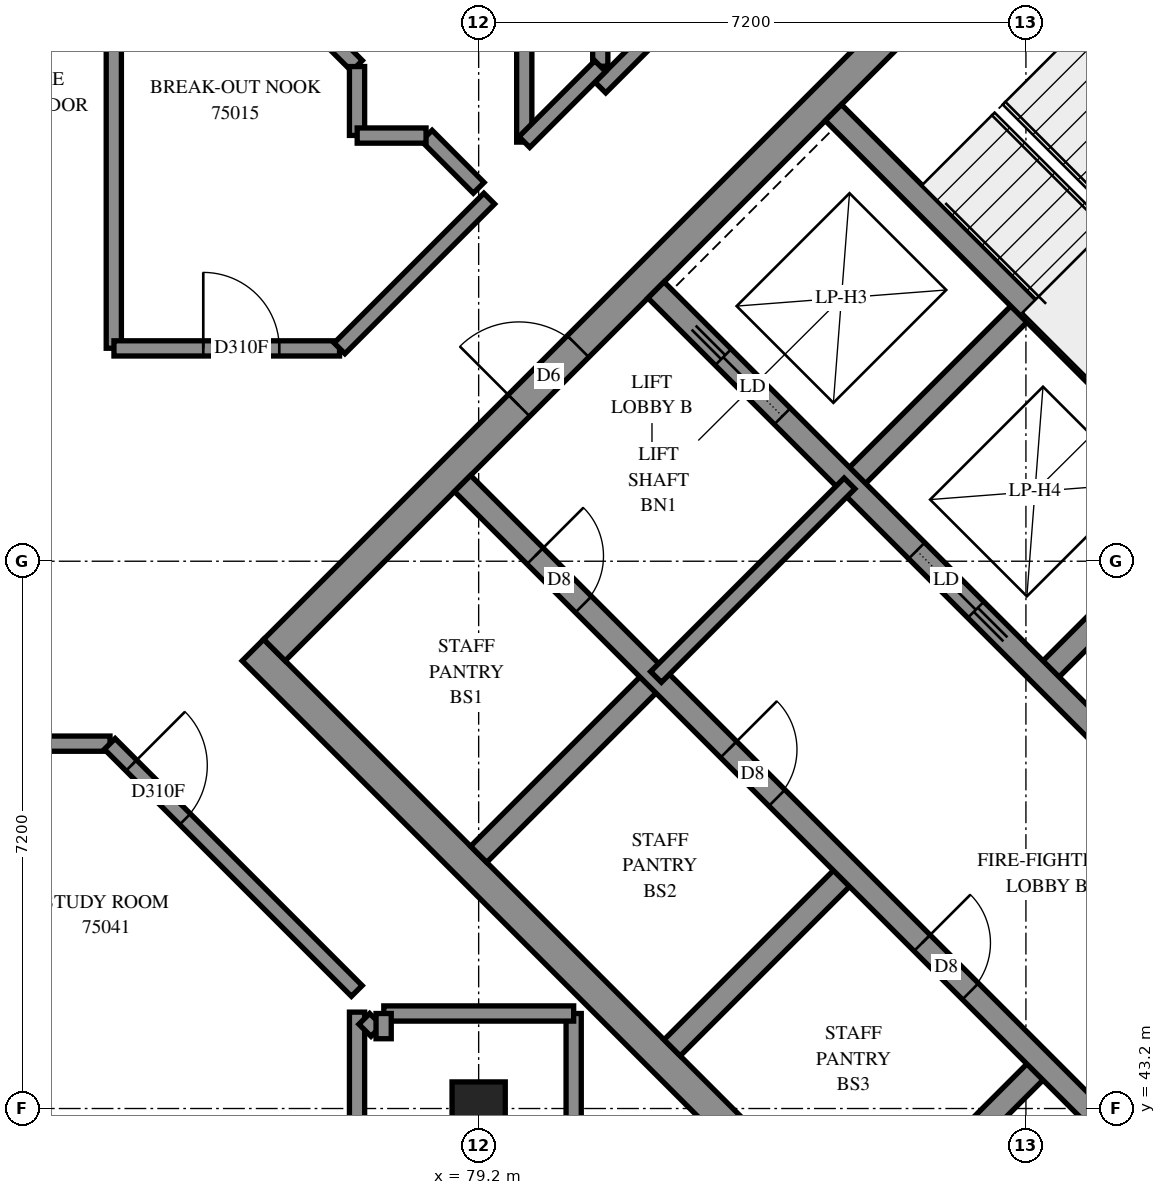
"""IFC4 building model, lengths in metres.
Left out: names, types, materials, properties, quantities, classifications, styles, units other than length and angle.
Written with IfcOpenShell. Run it as: python <this file> out.ifc"""

import sys

from ifc_helpers import new_model, si_unit, direction, frame, frame_2d, origin, origin_2d, place, context, subcontext, project, spatial, rectangle, extrude, element, fill, save


model = new_model("IFC4")
c1 = context("Model", 3, precision=1e-05, world=origin(), true_north=direction((0.0, 1.0)))
c2 = subcontext(c1, "Body", "Model", "MODEL_VIEW")
j1 = project(units=[si_unit("LENGTHUNIT", "METRE"), si_unit("PLANEANGLEUNIT", "RADIAN")], contexts=[c1])
p1 = place(None, origin())
s1 = spatial("IfcSite", under=j1, at=p1, CompositionType="ELEMENT")
p2 = place(p1, origin())
s2 = spatial("IfcBuilding", under=s1, at=p2, CompositionType="ELEMENT")
p3 = place(p2, frame((0.0, 0.0, 274.4)))
s3 = spatial("IfcBuildingStorey", under=s2, at=p3, CompositionType="ELEMENT", Elevation=274.4)
p4 = place(p3, frame((79.2, 43.2, 0.0), z_axis=(0.0, 0.0, 1.0), x_axis=(1.0, 0.0, 0.0)))
e1 = element("IfcColumn", 1, at=p4, inside=s3, PredefinedType="COLUMN", context=c2, shape_type="SweptSolid", body=[
    extrude(rectangle(XDim=0.7, YDim=0.7, at=origin_2d()), origin(), (0.0, 0.0, 1.0), 3.1),
])
p5 = place(p3, frame((76.23, 49.231, -0.3), z_axis=(0.0, 0.0, 1.0), x_axis=(0.7071034917, -0.7071100706, 0.0)))
e2 = element("IfcWall", 2, at=p5, inside=s3, PredefinedType="SHEAR", context=c2, shape_type="SweptSolid", body=[
    extrude(rectangle(XDim=15.2, YDim=0.4, at=frame_2d((7.6, 0.0))), origin(), (0.0, 0.0, 1.0), 2.7),
])
p6 = place(p3, frame((86.695, 59.696, -0.3), z_axis=(0.0, 0.0, 1.0), x_axis=(0.7071100706, -0.7071034917, 0.0)))
e3 = element("IfcWall", 3, at=p6, inside=s3, PredefinedType="SHEAR", context=c2, shape_type="SweptSolid", body=[
    extrude(rectangle(XDim=15.2, YDim=0.4, at=frame_2d((7.6, 0.0))), origin(), (0.0, 0.0, 1.0), 2.7),
])
p7 = place(p6, frame((10.4, 0.0, 0.3)))
e4 = element("IfcOpeningElement", 4, at=p7, cuts=e3, PredefinedType="OPENING", context=c2, shape_type="SweptSolid", body=[
    extrude(rectangle(XDim=0.8, YDim=2.1, at=frame_2d((0.4, 1.05))), frame((0.0, 0.21, 0.0), z_axis=(0.0, -1.0, 0.0), x_axis=(1.0, 0.0, 0.0)), (0.0, 0.0, 1.0), 0.42),
])
p8 = place(p3, frame((76.513, 49.231, -0.3), z_axis=(0.0, 0.0, 1.0), x_axis=(0.7071067812, 0.7071067812, 0.0)))
e5 = element("IfcWall", 5, at=p8, inside=s3, PredefinedType="SHEAR", context=c2, shape_type="SweptSolid", body=[
    extrude(rectangle(XDim=14.4, YDim=0.4, at=frame_2d((7.2, 0.0))), origin(), (0.0, 0.0, 1.0), 2.7),
])
p9 = place(p8, frame((4.55, 0.0, 0.3)))
e6 = element("IfcOpeningElement", 6, at=p9, cuts=e5, PredefinedType="OPENING", context=c2, shape_type="SweptSolid", body=[
    extrude(rectangle(XDim=1.1, YDim=2.1, at=frame_2d((0.55, 1.05))), frame((0.0, 0.21, 0.0), z_axis=(0.0, -1.0, 0.0), x_axis=(1.0, 0.0, 0.0)), (0.0, 0.0, 1.0), 0.42),
])
p10 = place(p8, frame((11.35, 0.0, 0.3)))
e7 = element("IfcOpeningElement", 7, at=p10, cuts=e5, PredefinedType="OPENING", context=c2, shape_type="SweptSolid", body=[
    extrude(rectangle(XDim=1.1, YDim=2.1, at=frame_2d((0.55, 1.05))), frame((0.0, 0.21, 0.0), z_axis=(0.0, -1.0, 0.0), x_axis=(1.0, 0.0, 0.0)), (0.0, 0.0, 1.0), 0.42),
])
p11 = place(p3, frame((86.978, 38.766, -0.3), z_axis=(0.0, 0.0, 1.0), x_axis=(0.7071067812, 0.7071067812, 0.0)))
e8 = element("IfcWall", 8, at=p11, inside=s3, PredefinedType="SHEAR", context=c2, shape_type="SweptSolid", body=[
    extrude(rectangle(XDim=14.4, YDim=0.4, at=frame_2d((7.2, 0.0))), origin(), (0.0, 0.0, 1.0), 2.7),
])
p12 = place(p11, frame((4.55, 0.0, 0.3)))
e9 = element("IfcOpeningElement", 9, at=p12, cuts=e8, PredefinedType="OPENING", context=c2, shape_type="SweptSolid", body=[
    extrude(rectangle(XDim=1.1, YDim=2.1, at=frame_2d((0.55, 1.05))), frame((0.0, 0.21, 0.0), z_axis=(0.0, -1.0, 0.0), x_axis=(1.0, 0.0, 0.0)), (0.0, 0.0, 1.0), 0.42),
])
p13 = place(p11, frame((11.35, 0.0, 0.3)))
e10 = element("IfcOpeningElement", 10, at=p13, cuts=e8, PredefinedType="OPENING", context=c2, shape_type="SweptSolid", body=[
    extrude(rectangle(XDim=1.1, YDim=2.1, at=frame_2d((0.55, 1.05))), frame((0.0, 0.21, 0.0), z_axis=(0.0, -1.0, 0.0), x_axis=(1.0, 0.0, 0.0)), (0.0, 0.0, 1.0), 0.42),
])
for number, where, z_axis, x_axis in (
    (11, (79.2, 46.544, 0.0), (0.0, 0.0, 1.0), (0.707, 0.707, 0.0)),
    (12, (84.079, 51.423, 0.0), (0.0, 0.0, 1.0), (0.707, 0.707, 0.0)),
):
    element("IfcWall", number, at=place(p3, frame(where, z_axis=z_axis, x_axis=x_axis)), inside=s3, PredefinedType="SOLIDWALL", context=c2, shape_type="SweptSolid", body=[
        extrude(rectangle(XDim=3.3, YDim=0.3, at=frame_2d((1.65, 0.0))), origin(), (0.0, 0.0, 1.0), 3.1),
    ])
p14 = place(p3, frame((81.746, 43.999, 0.0), z_axis=(0.0, 0.0, 1.0), x_axis=(0.7071067812, 0.7071067812, 0.0)))
e13 = element("IfcWall", 13, at=p14, inside=s3, PredefinedType="SOLIDWALL", context=c2, shape_type="SweptSolid", body=[
    extrude(rectangle(XDim=3.3, YDim=0.3, at=frame_2d((1.65, 0.0))), origin(), (0.0, 0.0, 1.0), 3.1),
])
p15 = place(p3, frame((86.625, 48.878, 0.0), z_axis=(0.0, 0.0, 1.0), x_axis=(0.7071067812, 0.7071067812, 0.0)))
e14 = element("IfcWall", 14, at=p15, inside=s3, PredefinedType="SOLIDWALL", context=c2, shape_type="SweptSolid", body=[
    extrude(rectangle(XDim=3.3, YDim=0.3, at=frame_2d((1.65, 0.0))), origin(), (0.0, 0.0, 1.0), 3.1),
])
p16 = place(p3, frame((84.291, 41.453, 0.0), z_axis=(0.0, 0.0, 1.0), x_axis=(0.7071067812, 0.7071067812, 0.0)))
e15 = element("IfcWall", 15, at=p16, inside=s3, PredefinedType="SOLIDWALL", context=c2, shape_type="SweptSolid", body=[
    extrude(rectangle(XDim=3.3, YDim=0.3, at=frame_2d((1.65, 0.0))), origin(), (0.0, 0.0, 1.0), 3.1),
])
p17 = place(p3, frame((78.988, 51.423, 0.0), z_axis=(0.0, 0.0, 1.0), x_axis=(0.7071067812, -0.7071067812, 0.0)))
e16 = element("IfcWall", 16, at=p17, inside=s3, PredefinedType="SOLIDWALL", context=c2, shape_type="SweptSolid", body=[
    extrude(rectangle(XDim=14.4, YDim=0.3, at=frame_2d((7.2, 0.0))), origin(), (0.0, 0.0, 1.0), 3.1),
])
p18 = place(p17, frame((1.35, 0.0, 0.0)))
e17 = element("IfcOpeningElement", 17, at=p18, cuts=e16, PredefinedType="OPENING", context=c2, shape_type="SweptSolid", body=[
    extrude(rectangle(XDim=0.9, YDim=2.1, at=frame_2d((0.45, 1.05))), frame((0.0, 0.16, 0.0), z_axis=(0.0, -1.0, 0.0), x_axis=(1.0, 0.0, 0.0)), (0.0, 0.0, 1.0), 0.32),
])
p19 = place(p17, frame((4.95, 0.0, 0.0)))
e18 = element("IfcOpeningElement", 18, at=p19, cuts=e16, PredefinedType="OPENING", context=c2, shape_type="SweptSolid", body=[
    extrude(rectangle(XDim=0.9, YDim=2.1, at=frame_2d((0.45, 1.05))), frame((0.0, 0.16, 0.0), z_axis=(0.0, -1.0, 0.0), x_axis=(1.0, 0.0, 0.0)), (0.0, 0.0, 1.0), 0.32),
])
p20 = place(p17, frame((8.55, 0.0, 0.0)))
e19 = element("IfcOpeningElement", 19, at=p20, cuts=e16, PredefinedType="OPENING", context=c2, shape_type="SweptSolid", body=[
    extrude(rectangle(XDim=0.9, YDim=2.1, at=frame_2d((0.45, 1.05))), frame((0.0, 0.16, 0.0), z_axis=(0.0, -1.0, 0.0), x_axis=(1.0, 0.0, 0.0)), (0.0, 0.0, 1.0), 0.32),
])
p21 = place(p17, frame((12.05, 0.0, 0.0)))
e20 = element("IfcOpeningElement", 20, at=p21, cuts=e16, PredefinedType="OPENING", context=c2, shape_type="SweptSolid", body=[
    extrude(rectangle(XDim=1.1, YDim=2.1, at=frame_2d((0.55, 1.05))), frame((0.0, 0.16, 0.0), z_axis=(0.0, -1.0, 0.0), x_axis=(1.0, 0.0, 0.0)), (0.0, 0.0, 1.0), 0.32),
])
p22 = place(p3, frame((81.534, 53.969, 0.0), z_axis=(0.0, 0.0, 1.0), x_axis=(0.707103309, -0.7071102534, 0.0)))
e21 = element("IfcWall", 21, at=p22, inside=s3, PredefinedType="SOLIDWALL", context=c2, shape_type="SweptSolid", body=[
    extrude(rectangle(XDim=14.4, YDim=0.3, at=frame_2d((7.2, 0.0))), origin(), (0.0, 0.0, 1.0), 3.1),
])
p23 = place(p22, frame((8.55, 0.0, 0.0)))
e22 = element("IfcOpeningElement", 22, at=p23, cuts=e21, PredefinedType="OPENING", context=c2, shape_type="SweptSolid", body=[
    extrude(rectangle(XDim=0.9, YDim=2.1, at=frame_2d((0.45, 1.05))), frame((0.0, 0.16, 0.0), z_axis=(0.0, -1.0, 0.0), x_axis=(1.0, 0.0, 0.0)), (0.0, 0.0, 1.0), 0.32),
])
p24 = place(p22, frame((1.25, 0.0, 0.0)))
e23 = element("IfcOpeningElement", 23, at=p24, cuts=e21, PredefinedType="OPENING", context=c2, shape_type="SweptSolid", body=[
    extrude(rectangle(XDim=1.1, YDim=2.1, at=frame_2d((0.55, 1.05))), frame((0.0, 0.16, 0.0), z_axis=(0.0, -1.0, 0.0), x_axis=(1.0, 0.0, 0.0)), (0.0, 0.0, 1.0), 0.32),
])
p25 = place(p22, frame((4.85, 0.0, 0.0)))
e24 = element("IfcOpeningElement", 24, at=p25, cuts=e21, PredefinedType="OPENING", context=c2, shape_type="SweptSolid", body=[
    extrude(rectangle(XDim=1.1, YDim=2.1, at=frame_2d((0.55, 1.05))), frame((0.0, 0.16, 0.0), z_axis=(0.0, -1.0, 0.0), x_axis=(1.0, 0.0, 0.0)), (0.0, 0.0, 1.0), 0.32),
])
p26 = place(p22, frame((12.05, 0.0, 0.0)))
e25 = element("IfcOpeningElement", 25, at=p26, cuts=e21, PredefinedType="OPENING", context=c2, shape_type="SweptSolid", body=[
    extrude(rectangle(XDim=1.1, YDim=2.1, at=frame_2d((0.55, 1.05))), frame((0.0, 0.16, 0.0), z_axis=(0.0, -1.0, 0.0), x_axis=(1.0, 0.0, 0.0)), (0.0, 0.0, 1.0), 0.32),
])
p27 = place(p3, frame((83.867, 56.302, 0.0), z_axis=(0.0, 0.0, 1.0), x_axis=(0.7071137256, -0.7070998367, 0.0)))
e26 = element("IfcWall", 26, at=p27, inside=s3, PredefinedType="SOLIDWALL", context=c2, shape_type="SweptSolid", body=[
    extrude(rectangle(XDim=7.2, YDim=0.3, at=frame_2d((3.6, 0.0))), origin(), (0.0, 0.0, 1.0), 3.1),
])
p28 = place(p3, frame((81.534, 48.878, 0.0), z_axis=(0.0, 0.0, 1.0), x_axis=(0.707092892, 0.7071206701, 0.0)))
e27 = element("IfcWall", 27, at=p28, inside=s3, PredefinedType="PARTITIONING", context=c2, shape_type="SweptSolid", body=[
    extrude(rectangle(XDim=3.6, YDim=0.2, at=frame_2d((1.8, 0.0))), origin(), (0.0, 0.0, 1.0), 3.1),
])
p29 = place(p3, frame((55.2, 48.0, 0.0), z_axis=(0.0, 0.0, 1.0), x_axis=(1.0, 0.0, 0.0)))
e28 = element("IfcWall", 28, at=p29, inside=s3, PredefinedType="PARTITIONING", context=c2, shape_type="SweptSolid", body=[
    extrude(rectangle(XDim=19.15, YDim=0.2, at=frame_2d((9.575, 0.0))), origin(), (0.0, 0.0, 1.0), 3.1),
])
p30 = place(p29, frame((6.261, 0.0, 0.0)))
e29 = element("IfcOpeningElement", 29, at=p30, cuts=e28, PredefinedType="OPENING", context=c2, shape_type="SweptSolid", body=[
    extrude(rectangle(XDim=0.9, YDim=2.1, at=frame_2d((0.45, 1.05))), frame((0.0, 0.11, 0.0), z_axis=(0.0, -1.0, 0.0), x_axis=(1.0, 0.0, 0.0)), (0.0, 0.0, 1.0), 0.22),
])
p31 = place(p29, frame((13.499, 0.0, 0.0)))
e30 = element("IfcOpeningElement", 30, at=p31, cuts=e28, PredefinedType="OPENING", context=c2, shape_type="SweptSolid", body=[
    extrude(rectangle(XDim=0.9, YDim=2.1, at=frame_2d((0.45, 1.05))), frame((0.0, 0.11, 0.0), z_axis=(0.0, -1.0, 0.0), x_axis=(1.0, 0.0, 0.0)), (0.0, 0.0, 1.0), 0.22),
])
p32 = place(p3, frame((80.802, 56.633, 0.0), z_axis=(0.0, 0.0, 1.0), x_axis=(0.7071067812, 0.7071067812, 0.0)))
e31 = element("IfcWall", 31, at=p32, inside=s3, PredefinedType="PARTITIONING", context=c2, shape_type="SweptSolid", body=[
    extrude(rectangle(XDim=8.533, YDim=0.2, at=frame_2d((4.267, 0.0))), origin(), (0.0, 0.0, 1.0), 3.1),
])
p33 = place(p32, frame((0.817, 0.0, 0.0)))
e32 = element("IfcOpeningElement", 32, at=p33, cuts=e31, PredefinedType="OPENING", context=c2, shape_type="SweptSolid", body=[
    extrude(rectangle(XDim=1.0, YDim=2.1, at=frame_2d((0.5, 1.05))), frame((0.0, 0.11, 0.0), z_axis=(0.0, -1.0, 0.0), x_axis=(1.0, 0.0, 0.0)), (0.0, 0.0, 1.0), 0.22),
])
p34 = place(p3, frame((74.4, 53.202, 0.0), z_axis=(0.0, 0.0, 1.0), x_axis=(0.0, 1.0, 0.0)))
e33 = element("IfcWall", 33, at=p34, inside=s3, PredefinedType="PARTITIONING", context=c2, shape_type="SweptSolid", body=[
    extrude(rectangle(XDim=6.908, YDim=0.2, at=frame_2d((3.454, 0.0))), origin(), (0.0, 0.0, 1.0), 3.1),
])
p35 = place(p3, frame((74.347, 47.997, 0.0), z_axis=(0.0, 0.0, 1.0), x_axis=(0.7071067812, -0.7071067812, 0.0)))
e34 = element("IfcWall", 34, at=p35, inside=s3, PredefinedType="PARTITIONING", context=c2, shape_type="SweptSolid", body=[
    extrude(rectangle(XDim=4.596, YDim=0.2, at=frame_2d((2.298, 0.0))), origin(), (0.0, 0.0, 1.0), 3.1),
])
p36 = place(p35, frame((0.401, 0.0, 0.0)))
e35 = element("IfcOpeningElement", 35, at=p36, cuts=e34, PredefinedType="OPENING", context=c2, shape_type="SweptSolid", body=[
    extrude(rectangle(XDim=1.0, YDim=2.1, at=frame_2d((0.5, 1.05))), frame((0.0, 0.11, 0.0), z_axis=(0.0, -1.0, 0.0), x_axis=(1.0, 0.0, 0.0)), (0.0, 0.0, 1.0), 0.22),
])
p37 = place(p3, frame((79.8, 55.914, 0.0), z_axis=(0.0, 0.0, 1.0), x_axis=(0.0, 1.0, 0.0)))
e36 = element("IfcWall", 36, at=p37, inside=s3, PredefinedType="PARTITIONING", context=c2, shape_type="SweptSolid", body=[
    extrude(rectangle(XDim=3.286, YDim=0.2, at=frame_2d((1.643, 0.0))), origin(), (0.0, 0.0, 1.0), 3.1),
])
p38 = place(p3, frame((74.402, 53.2, 0.0), z_axis=(0.0, 0.0, 1.0), x_axis=(1.0, 0.0, 0.0)))
e37 = element("IfcWall", 37, at=p38, inside=s3, PredefinedType="PARTITIONING", context=c2, shape_type="SweptSolid", body=[
    extrude(rectangle(XDim=2.968, YDim=0.2, at=frame_2d((1.484, 0.0))), origin(), (0.0, 0.0, 1.0), 3.1),
])
p39 = place(p38, frame((1.175, 0.0, 0.0)))
e38 = element("IfcOpeningElement", 38, at=p39, cuts=e37, PredefinedType="OPENING", context=c2, shape_type="SweptSolid", body=[
    extrude(rectangle(XDim=1.0, YDim=2.1, at=frame_2d((0.5, 1.05))), frame((0.0, 0.11, 0.0), z_axis=(0.0, -1.0, 0.0), x_axis=(1.0, 0.0, 0.0)), (0.0, 0.0, 1.0), 0.22),
])
p40 = place(p3, frame((77.6, 41.472, 0.0), z_axis=(0.0, 0.0, 1.0), x_axis=(0.0, 1.0, 0.0)))
e39 = element("IfcWall", 39, at=p40, inside=s3, PredefinedType="PARTITIONING", context=c2, shape_type="SweptSolid", body=[
    extrude(rectangle(XDim=2.996, YDim=0.2, at=frame_2d((1.498, 0.0))), origin(), (0.0, 0.0, 1.0), 3.1),
])
p41 = place(p3, frame((75.601, 58.913, 0.0), z_axis=(0.0, 0.0, 1.0), x_axis=(0.707460777, -0.7067526081, 0.0)))
e40 = element("IfcWall", 40, at=p41, inside=s3, PredefinedType="PARTITIONING", context=c2, shape_type="SweptSolid", body=[
    extrude(rectangle(XDim=2.824, YDim=0.2, at=frame_2d((1.412, 0.0))), origin(), (0.0, 0.0, 1.0), 3.1),
])
p42 = place(p3, frame((77.37, 53.2, 0.0), z_axis=(0.0, 0.0, 1.0), x_axis=(0.7071067812, 0.7071067812, 0.0)))
e41 = element("IfcWall", 41, at=p42, inside=s3, PredefinedType="PARTITIONING", context=c2, shape_type="SweptSolid", body=[
    extrude(rectangle(XDim=2.786, YDim=0.2, at=frame_2d((1.393, 0.0))), origin(), (0.0, 0.0, 1.0), 3.1),
])
for number, where, z_axis, x_axis in (
    (42, (80.45, 41.952, 0.0), (0.0, 0.0, 1.0), (0.0, 1.0, 0.0)),
    (43, (77.952, 44.45, 0.0), (0.0, 0.0, 1.0), (1.0, 0.0, 0.0)),
):
    element("IfcWall", number, at=place(p3, frame(where, z_axis=z_axis, x_axis=x_axis)), inside=s3, PredefinedType="PARTITIONING", context=c2, shape_type="SweptSolid", body=[
        extrude(rectangle(XDim=2.498, YDim=0.2, at=frame_2d((1.249, 0.0))), origin(), (0.0, 0.0, 1.0), 3.1),
    ])
p43 = place(p3, frame((80.8, 56.912, 0.0), z_axis=(0.0, 0.0, 1.0), x_axis=(0.0, 1.0, 0.0)))
e44 = element("IfcWall", 44, at=p43, inside=s3, PredefinedType="PARTITIONING", context=c2, shape_type="SweptSolid", body=[
    extrude(rectangle(XDim=1.414, YDim=0.2, at=frame_2d((0.707, 0.0))), origin(), (0.0, 0.0, 1.0), 3.1),
])
p44 = place(p3, frame((79.801, 55.915, 0.0), z_axis=(0.0, 0.0, 1.0), x_axis=(0.7071067812, 0.7071067812, 0.0)))
e45 = element("IfcWall", 45, at=p44, inside=s3, PredefinedType="PARTITIONING", context=c2, shape_type="SweptSolid", body=[
    extrude(rectangle(XDim=1.411, YDim=0.2, at=frame_2d((0.706, 0.0))), origin(), (0.0, 0.0, 1.0), 3.1),
])
p45 = place(p3, frame((78.517, 55.999, 0.0), z_axis=(0.0, 0.0, 1.0), x_axis=(0.7060737561, -0.7081382993, 0.0)))
e46 = element("IfcWall", 46, at=p45, inside=s3, PredefinedType="PARTITIONING", context=c2, shape_type="SweptSolid", body=[
    extrude(rectangle(XDim=0.969, YDim=0.2, at=frame_2d((0.484, 0.0))), origin(), (0.0, 0.0, 1.0), 3.1),
])
for number, where, z_axis, x_axis in (
    (47, (77.6, 56.002, 0.0), (0.0, 0.0, 1.0), (0.0, 1.0, 0.0)),
    (48, (77.602, 56.0, 0.0), (0.0, 0.0, 1.0), (1.0, 0.0, 0.0)),
):
    element("IfcWall", number, at=place(p3, frame(where, z_axis=z_axis, x_axis=x_axis)), inside=s3, PredefinedType="PARTITIONING", context=c2, shape_type="SweptSolid", body=[
        extrude(rectangle(XDim=0.906, YDim=0.2, at=frame_2d((0.453, 0.0))), origin(), (0.0, 0.0, 1.0), 3.1),
    ])
p46 = place(p3, frame((77.695, 44.38, 0.0), z_axis=(0.0, 0.0, 1.0), x_axis=(0.707329037, -0.7068844555, 0.0)))
e49 = element("IfcWall", 49, at=p46, inside=s3, PredefinedType="PARTITIONING", context=c2, shape_type="SweptSolid", body=[
    extrude(rectangle(XDim=0.225, YDim=0.2, at=frame_2d((0.112, 0.0))), origin(), (0.0, 0.0, 1.0), 3.1),
])
p47 = place(p3, frame((77.95, 44.118, 0.0), z_axis=(0.0, 0.0, 1.0), x_axis=(0.0, 1.0, 0.0)))
e50 = element("IfcWall", 50, at=p47, inside=s3, PredefinedType="PARTITIONING", context=c2, shape_type="SweptSolid", body=[
    extrude(rectangle(XDim=0.332, YDim=0.2, at=frame_2d((0.166, 0.0))), origin(), (0.0, 0.0, 1.0), 3.1),
])
p48 = place(p9, origin())
e51 = element("IfcDoor", 51, at=p48, inside=s3, OperationType="DOUBLE_DOOR_SINGLE_SWING", PredefinedType="DOOR", context=c2, shape_type="SweptSolid", body=[
    extrude(rectangle(XDim=1.1, YDim=2.1, at=frame_2d((0.55, 1.05))), frame((0.0, 0.025, 0.0), z_axis=(0.0, -1.0, 0.0), x_axis=(1.0, 0.0, 0.0)), (0.0, 0.0, 1.0), 0.05),
])
fill(e6, e51)
p49 = place(p18, origin())
e52 = element("IfcDoor", 52, at=p49, inside=s3, OperationType="SINGLE_SWING_LEFT", PredefinedType="DOOR", context=c2, shape_type="SweptSolid", body=[
    extrude(rectangle(XDim=0.9, YDim=2.1, at=frame_2d((0.45, 1.05))), frame((0.0, 0.025, 0.0), z_axis=(0.0, -1.0, 0.0), x_axis=(1.0, 0.0, 0.0)), (0.0, 0.0, 1.0), 0.05),
])
fill(e17, e52)
p50 = place(p19, origin())
e53 = element("IfcDoor", 53, at=p50, inside=s3, OperationType="SINGLE_SWING_LEFT", PredefinedType="DOOR", context=c2, shape_type="SweptSolid", body=[
    extrude(rectangle(XDim=0.9, YDim=2.1, at=frame_2d((0.45, 1.05))), frame((0.0, 0.025, 0.0), z_axis=(0.0, -1.0, 0.0), x_axis=(1.0, 0.0, 0.0)), (0.0, 0.0, 1.0), 0.05),
])
fill(e18, e53)
p51 = place(p20, origin())
e54 = element("IfcDoor", 54, at=p51, inside=s3, OperationType="SINGLE_SWING_LEFT", PredefinedType="DOOR", context=c2, shape_type="SweptSolid", body=[
    extrude(rectangle(XDim=0.9, YDim=2.1, at=frame_2d((0.45, 1.05))), frame((0.0, 0.025, 0.0), z_axis=(0.0, -1.0, 0.0), x_axis=(1.0, 0.0, 0.0)), (0.0, 0.0, 1.0), 0.05),
])
fill(e19, e54)
p52 = place(p24, origin())
e55 = element("IfcDoor", 55, at=p52, inside=s3, OperationType="SLIDING_TO_LEFT", PredefinedType="DOOR", context=c2, shape_type="SweptSolid", body=[
    extrude(rectangle(XDim=1.1, YDim=2.1, at=frame_2d((0.55, 1.05))), frame((0.0, 0.025, 0.0), z_axis=(0.0, -1.0, 0.0), x_axis=(1.0, 0.0, 0.0)), (0.0, 0.0, 1.0), 0.05),
])
fill(e23, e55)
p53 = place(p25, origin())
e56 = element("IfcDoor", 56, at=p53, inside=s3, OperationType="SLIDING_TO_RIGHT", PredefinedType="DOOR", context=c2, shape_type="SweptSolid", body=[
    extrude(rectangle(XDim=1.1, YDim=2.1, at=frame_2d((0.55, 1.05))), frame((0.0, 0.025, 0.0), z_axis=(0.0, -1.0, 0.0), x_axis=(1.0, 0.0, 0.0)), (0.0, 0.0, 1.0), 0.05),
])
fill(e24, e56)
p54 = place(p39, origin())
e57 = element("IfcDoor", 57, at=p54, inside=s3, OperationType="SINGLE_SWING_LEFT", PredefinedType="DOOR", context=c2, shape_type="SweptSolid", body=[
    extrude(rectangle(XDim=1.0, YDim=2.1, at=frame_2d((0.5, 1.05))), frame((0.0, 0.025, 0.0), z_axis=(0.0, -1.0, 0.0), x_axis=(1.0, 0.0, 0.0)), (0.0, 0.0, 1.0), 0.05),
])
fill(e38, e57)
p55 = place(p36, origin())
e58 = element("IfcDoor", 58, at=p55, inside=s3, OperationType="SINGLE_SWING_LEFT", PredefinedType="DOOR", context=c2, shape_type="SweptSolid", body=[
    extrude(rectangle(XDim=1.0, YDim=2.1, at=frame_2d((0.5, 1.05))), frame((0.0, 0.025, 0.0), z_axis=(0.0, -1.0, 0.0), x_axis=(1.0, 0.0, 0.0)), (0.0, 0.0, 1.0), 0.05),
])
fill(e35, e58)
save(model, sys.argv[1])
